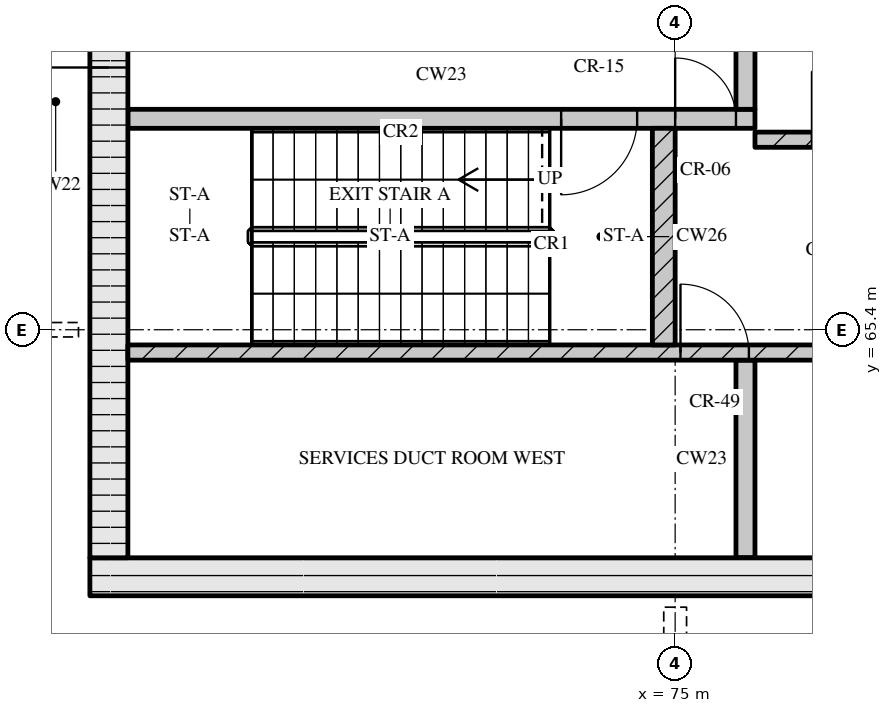
"""IFC4 building model, lengths in metres.
Left out: names, types, materials, properties, quantities, classifications, styles, units other than length and angle.
Written with IfcOpenShell. Run it as: python <this file> out.ifc"""

import sys

from ifc_helpers import new_model, si_unit, direction, frame, frame_2d, origin, place, context, subcontext, project, spatial, rectangle, extrude, element, fill, save


model = new_model("IFC4")
c1 = context("Model", 3, precision=1e-05, world=origin(), true_north=direction((0.0, 1.0)))
c2 = subcontext(c1, "Body", "Model", "MODEL_VIEW")
j1 = project(units=[si_unit("LENGTHUNIT", "METRE"), si_unit("PLANEANGLEUNIT", "RADIAN")], contexts=[c1])
p1 = place(None, origin())
s1 = spatial("IfcSite", under=j1, at=p1, CompositionType="ELEMENT")
p2 = place(p1, origin())
s2 = spatial("IfcBuilding", under=s1, at=p2, CompositionType="ELEMENT")
p3 = place(p2, frame((0.0, 0.0, 252.3)))
s3 = spatial("IfcBuildingStorey", under=s2, at=p3, CompositionType="ELEMENT", Elevation=252.3)
p4 = place(p3, frame((67.3, 62.15, 0.0), z_axis=(0.0, 0.0, 1.0), x_axis=(1.0, 0.0, 0.0)))
e1 = element("IfcWall", 1, at=p4, inside=s3, PredefinedType="SOLIDWALL", context=c2, shape_type="SweptSolid", body=[
    extrude(rectangle(XDim=40.6, YDim=0.5, at=frame_2d((20.3, 0.0))), origin(), (0.0, 0.0, 1.0), 10.97),
])
p5 = place(p4, frame((20.65, 0.0, 0.0)))
e2 = element("IfcOpeningElement", 2, at=p5, cuts=e1, PredefinedType="OPENING", context=c2, shape_type="SweptSolid", body=[
    extrude(rectangle(XDim=1.8, YDim=2.1, at=frame_2d((0.9, 1.05))), frame((0.0, 0.26, 0.0), z_axis=(0.0, -1.0, 0.0), x_axis=(1.0, 0.0, 0.0)), (0.0, 0.0, 1.0), 0.52),
])
p6 = place(p3, frame((67.55, 62.4, 0.0), z_axis=(0.0, 0.0, 1.0), x_axis=(0.0, 1.0, 0.0)))
e3 = element("IfcWall", 3, at=p6, inside=s3, PredefinedType="SOLIDWALL", context=c2, shape_type="SweptSolid", body=[
    extrude(rectangle(XDim=12.0, YDim=0.5, at=frame_2d((6.0, 0.0))), origin(), (0.0, 0.0, 1.0), 10.97),
])
p7 = place(p6, frame((6.45, 0.0, 0.0)))
e4 = element("IfcOpeningElement", 4, at=p7, cuts=e3, PredefinedType="OPENING", context=c2, shape_type="SweptSolid", body=[
    extrude(rectangle(XDim=1.2, YDim=2.1, at=frame_2d((0.6, 1.05))), frame((0.0, 0.26, 0.0), z_axis=(0.0, -1.0, 0.0), x_axis=(1.0, 0.0, 0.0)), (0.0, 0.0, 1.0), 0.52),
])
p8 = place(p3, frame((75.925, 62.4, 0.0), z_axis=(0.0, 0.0, 1.0), x_axis=(0.0, 1.0, 0.0)))
e5 = element("IfcWall", 5, at=p8, inside=s3, PredefinedType="SOLIDWALL", context=c2, shape_type="SweptSolid", body=[
    extrude(rectangle(XDim=2.6, YDim=0.25, at=frame_2d((1.3, 0.0))), origin(), (0.0, 0.0, 1.0), 10.97),
])
p9 = place(p3, frame((67.8, 65.1, 0.0), z_axis=(0.0, 0.0, 1.0), x_axis=(1.0, 0.0, 0.0)))
e6 = element("IfcWall", 6, at=p9, inside=s3, PredefinedType="SOLIDWALL", context=c2, shape_type="SweptSolid", body=[
    extrude(rectangle(XDim=18.5, YDim=0.2, at=frame_2d((9.25, 0.0))), origin(), (0.0, 0.0, 1.0), 10.97),
])
p10 = place(p9, frame((7.27, 0.0, 0.0)))
e7 = element("IfcOpeningElement", 7, at=p10, cuts=e6, PredefinedType="OPENING", context=c2, shape_type="SweptSolid", body=[
    extrude(rectangle(XDim=0.9, YDim=2.1, at=frame_2d((0.45, 1.05))), frame((0.0, 0.11, 0.0), z_axis=(0.0, -1.0, 0.0), x_axis=(1.0, 0.0, 0.0)), (0.0, 0.0, 1.0), 0.22),
])
p11 = place(p9, frame((9.65, 0.0, 0.0)))
e8 = element("IfcOpeningElement", 8, at=p11, cuts=e6, PredefinedType="OPENING", context=c2, shape_type="SweptSolid", body=[
    extrude(rectangle(XDim=0.9, YDim=2.1, at=frame_2d((0.45, 1.05))), frame((0.0, 0.11, 0.0), z_axis=(0.0, -1.0, 0.0), x_axis=(1.0, 0.0, 0.0)), (0.0, 0.0, 1.0), 0.22),
])
p12 = place(p9, frame((13.36, 0.0, 0.0)))
e9 = element("IfcOpeningElement", 9, at=p12, cuts=e6, PredefinedType="OPENING", context=c2, shape_type="SweptSolid", body=[
    extrude(rectangle(XDim=0.9, YDim=2.1, at=frame_2d((0.45, 1.05))), frame((0.0, 0.11, 0.0), z_axis=(0.0, -1.0, 0.0), x_axis=(1.0, 0.0, 0.0)), (0.0, 0.0, 1.0), 0.22),
])
p13 = place(p9, frame((16.7, 0.0, 0.0)))
e10 = element("IfcOpeningElement", 10, at=p13, cuts=e6, PredefinedType="OPENING", context=c2, shape_type="SweptSolid", body=[
    extrude(rectangle(XDim=0.9, YDim=2.1, at=frame_2d((0.45, 1.05))), frame((0.0, 0.11, 0.0), z_axis=(0.0, -1.0, 0.0), x_axis=(1.0, 0.0, 0.0)), (0.0, 0.0, 1.0), 0.22),
])
p14 = place(p3, frame((74.85, 65.2, 0.0), z_axis=(0.0, 0.0, 1.0), x_axis=(0.0, 1.0, 0.0)))
e11 = element("IfcWall", 11, at=p14, inside=s3, PredefinedType="SOLIDWALL", context=c2, shape_type="SweptSolid", body=[
    extrude(rectangle(XDim=2.85, YDim=0.3, at=frame_2d((1.425, 0.0))), origin(), (0.0, 0.0, 1.0), 10.97),
])
p15 = place(p3, frame((76.05, 67.9, 0.0), z_axis=(0.0, 0.0, 1.0), x_axis=(1.0, 0.0, 0.0)))
e12 = element("IfcWall", 12, at=p15, inside=s3, PredefinedType="SOLIDWALL", context=c2, shape_type="SweptSolid", body=[
    extrude(rectangle(XDim=23.1, YDim=0.2, at=frame_2d((11.55, 0.0))), origin(), (0.0, 0.0, 1.0), 10.97),
])
p16 = place(p15, frame((0.75, 0.0, 0.0)))
e13 = element("IfcOpeningElement", 13, at=p16, cuts=e12, PredefinedType="OPENING", context=c2, shape_type="SweptSolid", body=[
    extrude(rectangle(XDim=0.9, YDim=2.1, at=frame_2d((0.45, 1.05))), frame((0.0, 0.11, 0.0), z_axis=(0.0, -1.0, 0.0), x_axis=(1.0, 0.0, 0.0)), (0.0, 0.0, 1.0), 0.22),
])
p17 = place(p15, frame((3.32, 0.0, 0.0)))
e14 = element("IfcOpeningElement", 14, at=p17, cuts=e12, PredefinedType="OPENING", context=c2, shape_type="SweptSolid", body=[
    extrude(rectangle(XDim=0.9, YDim=2.1, at=frame_2d((0.45, 1.05))), frame((0.0, 0.11, 0.0), z_axis=(0.0, -1.0, 0.0), x_axis=(1.0, 0.0, 0.0)), (0.0, 0.0, 1.0), 0.22),
])
p18 = place(p15, frame((5.77, 0.0, 0.0)))
e15 = element("IfcOpeningElement", 15, at=p18, cuts=e12, PredefinedType="OPENING", context=c2, shape_type="SweptSolid", body=[
    extrude(rectangle(XDim=0.9, YDim=2.1, at=frame_2d((0.45, 1.05))), frame((0.0, 0.11, 0.0), z_axis=(0.0, -1.0, 0.0), x_axis=(1.0, 0.0, 0.0)), (0.0, 0.0, 1.0), 0.22),
])
p19 = place(p15, frame((8.45, 0.0, 0.0)))
e16 = element("IfcOpeningElement", 16, at=p19, cuts=e12, PredefinedType="OPENING", context=c2, shape_type="SweptSolid", body=[
    extrude(rectangle(XDim=0.9, YDim=2.1, at=frame_2d((0.45, 1.05))), frame((0.0, 0.11, 0.0), z_axis=(0.0, -1.0, 0.0), x_axis=(1.0, 0.0, 0.0)), (0.0, 0.0, 1.0), 0.22),
])
p20 = place(p15, frame((10.91, 0.0, 0.0)))
e17 = element("IfcOpeningElement", 17, at=p20, cuts=e12, PredefinedType="OPENING", context=c2, shape_type="SweptSolid", body=[
    extrude(rectangle(XDim=0.9, YDim=2.1, at=frame_2d((0.45, 1.05))), frame((0.0, 0.11, 0.0), z_axis=(0.0, -1.0, 0.0), x_axis=(1.0, 0.0, 0.0)), (0.0, 0.0, 1.0), 0.22),
])
p21 = place(p15, frame((13.55, 0.0, 0.0)))
e18 = element("IfcOpeningElement", 18, at=p21, cuts=e12, PredefinedType="OPENING", context=c2, shape_type="SweptSolid", body=[
    extrude(rectangle(XDim=1.0, YDim=2.1, at=frame_2d((0.5, 1.05))), frame((0.0, 0.11, 0.0), z_axis=(0.0, -1.0, 0.0), x_axis=(1.0, 0.0, 0.0)), (0.0, 0.0, 1.0), 0.22),
])
p22 = place(p15, frame((16.2, 0.0, 0.0)))
e19 = element("IfcOpeningElement", 19, at=p22, cuts=e12, PredefinedType="OPENING", context=c2, shape_type="SweptSolid", body=[
    extrude(rectangle(XDim=1.1, YDim=2.1, at=frame_2d((0.55, 1.05))), frame((0.0, 0.11, 0.0), z_axis=(0.0, -1.0, 0.0), x_axis=(1.0, 0.0, 0.0)), (0.0, 0.0, 1.0), 0.22),
])
p23 = place(p15, frame((18.7, 0.0, 0.0)))
e20 = element("IfcOpeningElement", 20, at=p23, cuts=e12, PredefinedType="OPENING", context=c2, shape_type="SweptSolid", body=[
    extrude(rectangle(XDim=1.1, YDim=2.1, at=frame_2d((0.55, 1.05))), frame((0.0, 0.11, 0.0), z_axis=(0.0, -1.0, 0.0), x_axis=(1.0, 0.0, 0.0)), (0.0, 0.0, 1.0), 0.22),
])
p24 = place(p15, frame((21.2, 0.0, 0.0)))
e21 = element("IfcOpeningElement", 21, at=p24, cuts=e12, PredefinedType="OPENING", context=c2, shape_type="SweptSolid", body=[
    extrude(rectangle(XDim=1.1, YDim=2.1, at=frame_2d((0.55, 1.05))), frame((0.0, 0.11, 0.0), z_axis=(0.0, -1.0, 0.0), x_axis=(1.0, 0.0, 0.0)), (0.0, 0.0, 1.0), 0.22),
])
p25 = place(p3, frame((67.8, 68.175, 0.0), z_axis=(0.0, 0.0, 1.0), x_axis=(1.0, 0.0, 0.0)))
e22 = element("IfcWall", 22, at=p25, inside=s3, PredefinedType="SOLIDWALL", context=c2, shape_type="SweptSolid", body=[
    extrude(rectangle(XDim=8.25, YDim=0.25, at=frame_2d((4.125, 0.0))), origin(), (0.0, 0.0, 1.0), 10.97),
])
p26 = place(p25, frame((5.7, 0.0, 0.0)))
e23 = element("IfcOpeningElement", 23, at=p26, cuts=e22, PredefinedType="OPENING", context=c2, shape_type="SweptSolid", body=[
    extrude(rectangle(XDim=1.0, YDim=2.1, at=frame_2d((0.5, 1.05))), frame((0.0, 0.135, 0.0), z_axis=(0.0, -1.0, 0.0), x_axis=(1.0, 0.0, 0.0)), (0.0, 0.0, 1.0), 0.27),
])
p27 = place(p25, frame((7.2, 0.0, 0.0)))
e24 = element("IfcOpeningElement", 24, at=p27, cuts=e22, PredefinedType="OPENING", context=c2, shape_type="SweptSolid", body=[
    extrude(rectangle(XDim=0.8, YDim=2.1, at=frame_2d((0.4, 1.05))), frame((0.0, 0.135, 0.0), z_axis=(0.0, -1.0, 0.0), x_axis=(1.0, 0.0, 0.0)), (0.0, 0.0, 1.0), 0.27),
])
p28 = place(p3, frame((75.925, 68.3, 0.0), z_axis=(0.0, 0.0, 1.0), x_axis=(0.0, 1.0, 0.0)))
e25 = element("IfcWall", 25, at=p28, inside=s3, PredefinedType="SOLIDWALL", context=c2, shape_type="SweptSolid", body=[
    extrude(rectangle(XDim=2.3, YDim=0.25, at=frame_2d((1.15, 0.0))), origin(), (0.0, 0.0, 1.0), 10.97),
])
p29 = place(p10, origin())
e26 = element("IfcDoor", 26, at=p29, inside=s3, OperationType="SINGLE_SWING_LEFT", PredefinedType="DOOR", context=c2, shape_type="SweptSolid", body=[
    extrude(rectangle(XDim=0.9, YDim=2.1, at=frame_2d((0.45, 1.05))), frame((0.0, 0.025, 0.0), z_axis=(0.0, -1.0, 0.0), x_axis=(1.0, 0.0, 0.0)), (0.0, 0.0, 1.0), 0.05),
])
fill(e7, e26)
p30 = place(p26, origin())
e27 = element("IfcDoor", 27, at=p30, inside=s3, OperationType="SINGLE_SWING_RIGHT", PredefinedType="DOOR", context=c2, shape_type="SweptSolid", body=[
    extrude(rectangle(XDim=1.0, YDim=2.1, at=frame_2d((0.5, 1.05))), frame((0.0, 0.025, 0.0), z_axis=(0.0, -1.0, 0.0), x_axis=(1.0, 0.0, 0.0)), (0.0, 0.0, 1.0), 0.05),
])
fill(e23, e27)
p31 = place(p27, origin())
e28 = element("IfcDoor", 28, at=p31, inside=s3, OperationType="SINGLE_SWING_LEFT", PredefinedType="DOOR", context=c2, shape_type="SweptSolid", body=[
    extrude(rectangle(XDim=0.8, YDim=2.1, at=frame_2d((0.4, 1.05))), frame((0.0, 0.025, 0.0), z_axis=(0.0, -1.0, 0.0), x_axis=(1.0, 0.0, 0.0)), (0.0, 0.0, 1.0), 0.05),
])
fill(e24, e28)
p32 = place(p7, origin())
e29 = element("IfcDoor", 29, at=p32, inside=s3, OperationType="SINGLE_SWING_LEFT", PredefinedType="DOOR", context=c2, shape_type="SweptSolid", body=[
    extrude(rectangle(XDim=1.2, YDim=2.1, at=frame_2d((0.6, 1.05))), frame((0.0, 0.025, 0.0), z_axis=(0.0, -1.0, 0.0), x_axis=(1.0, 0.0, 0.0)), (0.0, 0.0, 1.0), 0.05),
])
fill(e4, e29)
save(model, sys.argv[1])
